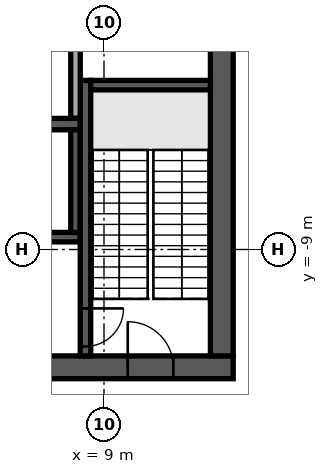
"""IFC4 building model, lengths in metres.
Left out: names, types, materials, properties, quantities, classifications, styles, units other than length and angle.
Written with IfcOpenShell. Run it as: python <this file> out.ifc"""

import sys

from ifc_helpers import new_model, si_unit, direction, frame, frame_2d, origin, place, context, subcontext, project, spatial, rectangle, extrude, element, fill, save


model = new_model("IFC4")
c1 = context("Model", 3, precision=1e-05, world=origin(), true_north=direction((0.0, 1.0)))
c2 = subcontext(c1, "Body", "Model", "MODEL_VIEW")
j1 = project(units=[si_unit("LENGTHUNIT", "METRE"), si_unit("PLANEANGLEUNIT", "RADIAN")], contexts=[c1])
p1 = place(None, origin())
s1 = spatial("IfcSite", under=j1, at=p1, CompositionType="ELEMENT")
p2 = place(p1, origin())
s2 = spatial("IfcBuilding", under=s1, at=p2, CompositionType="ELEMENT")
p3 = place(p2, frame((0.0, 0.0, 344.5)))
s3 = spatial("IfcBuildingStorey", under=s2, at=p3, CompositionType="ELEMENT", Elevation=344.5)
p4 = place(p3, frame((-12.4, -12.1, 0.0), z_axis=(0.0, 0.0, 1.0), x_axis=(1.0, 0.0, 0.0)))
e1 = element("IfcWall", 1, at=p4, inside=s3, PredefinedType="SHEAR", context=c2, shape_type="SweptSolid", body=[
    extrude(rectangle(XDim=24.8, YDim=0.6, at=frame_2d((12.4, 0.0))), origin(), (0.0, 0.0, 1.0), 5.3),
])
p5 = place(p4, frame((7.3, 0.0, 0.0)))
e2 = element("IfcOpeningElement", 2, at=p5, cuts=e1, PredefinedType="OPENING", context=c2, shape_type="SweptSolid", body=[
    extrude(rectangle(XDim=2.0, YDim=2.1, at=frame_2d((1.0, 1.05))), frame((0.0, 0.31, 0.0), z_axis=(0.0, -1.0, 0.0), x_axis=(1.0, 0.0, 0.0)), (0.0, 0.0, 1.0), 0.62),
])
p6 = place(p4, frame((17.425, 0.0, 0.0)))
e3 = element("IfcOpeningElement", 3, at=p6, cuts=e1, PredefinedType="OPENING", context=c2, shape_type="SweptSolid", body=[
    extrude(rectangle(XDim=1.2, YDim=2.1, at=frame_2d((0.6, 1.05))), frame((0.0, 0.31, 0.0), z_axis=(0.0, -1.0, 0.0), x_axis=(1.0, 0.0, 0.0)), (0.0, 0.0, 1.0), 0.62),
])
p7 = place(p4, frame((1.575, 0.0, 0.0)))
e4 = element("IfcOpeningElement", 4, at=p7, cuts=e1, PredefinedType="OPENING", context=c2, shape_type="SweptSolid", body=[
    extrude(rectangle(XDim=1.2, YDim=2.1, at=frame_2d((0.6, 1.05))), frame((0.0, 0.31, 0.0), z_axis=(0.0, -1.0, 0.0), x_axis=(1.0, 0.0, 0.0)), (0.0, 0.0, 1.0), 0.62),
])
p8 = place(p4, frame((22.025, 0.0, 0.0)))
e5 = element("IfcOpeningElement", 5, at=p8, cuts=e1, PredefinedType="OPENING", context=c2, shape_type="SweptSolid", body=[
    extrude(rectangle(XDim=1.2, YDim=2.1, at=frame_2d((0.6, 1.05))), frame((0.0, 0.31, 0.0), z_axis=(0.0, -1.0, 0.0), x_axis=(1.0, 0.0, 0.0)), (0.0, 0.0, 1.0), 0.62),
])
p9 = place(p3, frame((12.1, -11.8, 0.0), z_axis=(0.0, 0.0, 1.0), x_axis=(0.0, 1.0, 0.0)))
e6 = element("IfcWall", 6, at=p9, inside=s3, PredefinedType="SHEAR", context=c2, shape_type="SweptSolid", body=[
    extrude(rectangle(XDim=23.6, YDim=0.6, at=frame_2d((11.8, 0.0))), origin(), (0.0, 0.0, 1.0), 5.3),
])
p10 = place(p9, frame((10.6, 0.0, 0.0)))
e7 = element("IfcOpeningElement", 7, at=p10, cuts=e6, PredefinedType="OPENING", context=c2, shape_type="SweptSolid", body=[
    extrude(rectangle(XDim=2.4, YDim=2.4, at=frame_2d((1.2, 1.2))), frame((0.0, 0.31, 0.0), z_axis=(0.0, -1.0, 0.0), x_axis=(1.0, 0.0, 0.0)), (0.0, 0.0, 1.0), 0.62),
])
p11 = place(p3, frame((-2.875, -5.7, 0.0), z_axis=(0.0, 0.0, 1.0), x_axis=(1.0, 0.0, 0.0)))
e8 = element("IfcWall", 8, at=p11, inside=s3, PredefinedType="SOLIDWALL", context=c2, shape_type="SweptSolid", body=[
    extrude(rectangle(XDim=11.25, YDim=0.3, at=frame_2d((5.625, 0.0))), origin(), (0.0, 0.0, 1.0), 5.3),
])
p12 = place(p3, frame((-2.875, -8.675, 0.0), z_axis=(0.0, 0.0, 1.0), x_axis=(1.0, 0.0, 0.0)))
e9 = element("IfcWall", 9, at=p12, inside=s3, PredefinedType="SOLIDWALL", context=c2, shape_type="SweptSolid", body=[
    extrude(rectangle(XDim=11.25, YDim=0.25, at=frame_2d((5.625, 0.0))), origin(), (0.0, 0.0, 1.0), 5.3),
])
p13 = place(p12, frame((0.9, 0.0, 0.0)))
e10 = element("IfcOpeningElement", 10, at=p13, cuts=e9, PredefinedType="OPENING", context=c2, shape_type="SweptSolid", body=[
    extrude(rectangle(XDim=1.2, YDim=2.1, at=frame_2d((0.6, 1.05))), frame((0.0, 0.135, 0.0), z_axis=(0.0, -1.0, 0.0), x_axis=(1.0, 0.0, 0.0)), (0.0, 0.0, 1.0), 0.27),
])
p14 = place(p12, frame((3.65, 0.0, 0.0)))
e11 = element("IfcOpeningElement", 11, at=p14, cuts=e9, PredefinedType="OPENING", context=c2, shape_type="SweptSolid", body=[
    extrude(rectangle(XDim=1.2, YDim=2.1, at=frame_2d((0.6, 1.05))), frame((0.0, 0.135, 0.0), z_axis=(0.0, -1.0, 0.0), x_axis=(1.0, 0.0, 0.0)), (0.0, 0.0, 1.0), 0.27),
])
p15 = place(p12, frame((6.4, 0.0, 0.0)))
e12 = element("IfcOpeningElement", 12, at=p15, cuts=e9, PredefinedType="OPENING", context=c2, shape_type="SweptSolid", body=[
    extrude(rectangle(XDim=1.2, YDim=2.1, at=frame_2d((0.6, 1.05))), frame((0.0, 0.135, 0.0), z_axis=(0.0, -1.0, 0.0), x_axis=(1.0, 0.0, 0.0)), (0.0, 0.0, 1.0), 0.27),
])
p16 = place(p12, frame((9.15, 0.0, 0.0)))
e13 = element("IfcOpeningElement", 13, at=p16, cuts=e9, PredefinedType="OPENING", context=c2, shape_type="SweptSolid", body=[
    extrude(rectangle(XDim=1.2, YDim=2.1, at=frame_2d((0.6, 1.05))), frame((0.0, 0.135, 0.0), z_axis=(0.0, -1.0, 0.0), x_axis=(1.0, 0.0, 0.0)), (0.0, 0.0, 1.0), 0.27),
])
p17 = place(p3, frame((8.25, -8.55, 0.0), z_axis=(0.0, 0.0, 1.0), x_axis=(0.0, 1.0, 0.0)))
e14 = element("IfcWall", 14, at=p17, inside=s3, PredefinedType="SOLIDWALL", context=c2, shape_type="SweptSolid", body=[
    extrude(rectangle(XDim=2.7, YDim=0.25, at=frame_2d((1.35, 0.0))), origin(), (0.0, 0.0, 1.0), 5.3),
])
p18 = place(p3, frame((8.512, -4.55, 0.0), z_axis=(0.0, 0.0, 1.0), x_axis=(0.0, -1.0, 0.0)))
e15 = element("IfcWall", 15, at=p18, inside=s3, PredefinedType="SOLIDWALL", context=c2, shape_type="SweptSolid", body=[
    extrude(rectangle(XDim=7.25, YDim=0.275, at=frame_2d((3.625, 0.0))), origin(), (0.0, 0.0, 1.0), 5.3),
])
p19 = place(p18, frame((6.0, 0.0, 0.0)))
e16 = element("IfcOpeningElement", 16, at=p19, cuts=e15, PredefinedType="OPENING", context=c2, shape_type="SweptSolid", body=[
    extrude(rectangle(XDim=1.0, YDim=2.1, at=frame_2d((0.5, 1.05))), frame((0.0, 0.147, 0.0), z_axis=(0.0, -1.0, 0.0), x_axis=(1.0, 0.0, 0.0)), (0.0, 0.0, 1.0), 0.295),
])
p20 = place(p3, frame((8.65, -4.675, 0.0), z_axis=(0.0, 0.0, 1.0), x_axis=(1.0, 0.0, 0.0)))
e17 = element("IfcWall", 17, at=p20, inside=s3, PredefinedType="SOLIDWALL", context=c2, shape_type="SweptSolid", body=[
    extrude(rectangle(XDim=3.15, YDim=0.25, at=frame_2d((1.575, 0.0))), origin(), (0.0, 0.0, 1.0), 5.3),
])
p21 = place(p3, frame((8.25, -5.545, 0.0), z_axis=(0.0, 0.0, 1.0), x_axis=(0.0, 1.0, 0.0)))
e18 = element("IfcWall", 18, at=p21, inside=s3, PredefinedType="PARTITIONING", context=c2, shape_type="SweptSolid", body=[
    extrude(rectangle(XDim=2.69, YDim=0.25, at=frame_2d((1.345, 0.0))), origin(), (0.0, 0.0, 1.0), 5.3),
])
p22 = place(p8, origin())
e19 = element("IfcDoor", 19, at=p22, inside=s3, OperationType="SINGLE_SWING_LEFT", PredefinedType="DOOR", context=c2, shape_type="SweptSolid", body=[
    extrude(rectangle(XDim=1.2, YDim=2.1, at=frame_2d((0.6, 1.05))), frame((0.0, 0.025, 0.0), z_axis=(0.0, -1.0, 0.0), x_axis=(1.0, 0.0, 0.0)), (0.0, 0.0, 1.0), 0.05),
])
fill(e5, e19)
p23 = place(p19, origin())
e20 = element("IfcDoor", 20, at=p23, inside=s3, OperationType="SINGLE_SWING_LEFT", PredefinedType="DOOR", context=c2, shape_type="SweptSolid", body=[
    extrude(rectangle(XDim=1.0, YDim=2.1, at=frame_2d((0.5, 1.05))), frame((0.0, 0.025, 0.0), z_axis=(0.0, -1.0, 0.0), x_axis=(1.0, 0.0, 0.0)), (0.0, 0.0, 1.0), 0.05),
])
fill(e16, e20)
save(model, sys.argv[1])
